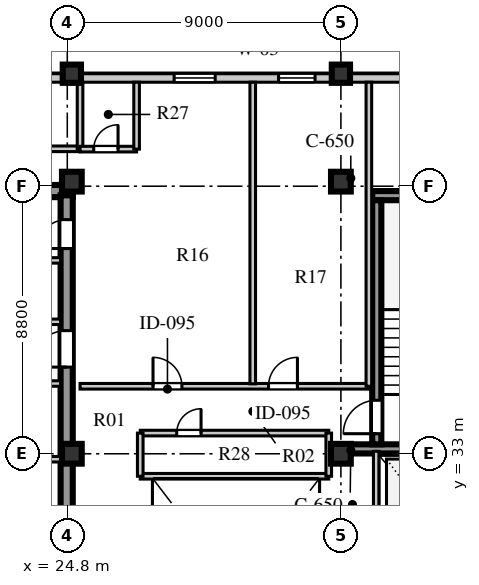
"""IFC4 building model, lengths in metres.
Left out: names, types, materials, properties, quantities, classifications, styles, units other than length and angle.
Written with IfcOpenShell. Run it as: python <this file> out.ifc"""

import sys

from ifc_helpers import new_model, si_unit, direction, frame, frame_2d, origin, origin_2d, place, context, subcontext, project, spatial, rectangle, extrude, element, fill, save


model = new_model("IFC4")
c1 = context("Model", 3, precision=1e-05, world=origin(), true_north=direction((0.0, 1.0)))
c2 = subcontext(c1, "Body", "Model", "MODEL_VIEW")
j1 = project(units=[si_unit("LENGTHUNIT", "METRE"), si_unit("PLANEANGLEUNIT", "RADIAN")], contexts=[c1])
p1 = place(None, origin())
s1 = spatial("IfcSite", under=j1, at=p1, CompositionType="ELEMENT")
p2 = place(p1, origin())
s2 = spatial("IfcBuilding", under=s1, at=p2, CompositionType="ELEMENT")
p3 = place(p2, frame((0.0, 0.0, 342.9)))
s3 = spatial("IfcBuildingStorey", under=s2, at=p3, CompositionType="ELEMENT", Elevation=342.9)
p4 = place(p3, frame((15.5, 41.64, 0.0), z_axis=(0.0, 0.0, 1.0), x_axis=(1.0, 0.0, 0.0)))
e1 = element("IfcWall", 1, at=p4, inside=s3, PredefinedType="SHEAR", context=c2, shape_type="SweptSolid", body=[
    extrude(rectangle(XDim=9.48, YDim=0.4, at=frame_2d((4.74, 0.0))), origin(), (0.0, 0.0, 1.0), 3.55),
])
p5 = place(p3, frame((24.78, 15.74, 0.0), z_axis=(0.0, 0.0, 1.0), x_axis=(0.0, 1.0, 0.0)))
e2 = element("IfcWall", 2, at=p5, inside=s3, PredefinedType="SHEAR", context=c2, shape_type="SweptSolid", body=[
    extrude(rectangle(XDim=25.76, YDim=0.4, at=frame_2d((12.88, 0.0))), origin(), (0.0, 0.0, 1.0), 3.55),
])
p6 = place(p5, frame((1.61, 0.0, 0.0)))
e3 = element("IfcOpeningElement", 3, at=p6, cuts=e2, PredefinedType="OPENING", context=c2, shape_type="SweptSolid", body=[
    extrude(rectangle(XDim=1.2, YDim=2.1, at=frame_2d((0.6, 1.05))), frame((0.0, 0.21, 0.0), z_axis=(0.0, -1.0, 0.0), x_axis=(1.0, 0.0, 0.0)), (0.0, 0.0, 1.0), 0.42),
])
p7 = place(p5, frame((6.78, 0.0, 0.0)))
e4 = element("IfcOpeningElement", 4, at=p7, cuts=e2, PredefinedType="OPENING", context=c2, shape_type="SweptSolid", body=[
    extrude(rectangle(XDim=0.85, YDim=2.06, at=frame_2d((0.425, 1.03))), frame((0.0, 0.21, 0.0), z_axis=(0.0, -1.0, 0.0), x_axis=(1.0, 0.0, 0.0)), (0.0, 0.0, 1.0), 0.42),
])
p8 = place(p5, frame((12.11, 0.0, 0.0)))
e5 = element("IfcOpeningElement", 5, at=p8, cuts=e2, PredefinedType="OPENING", context=c2, shape_type="SweptSolid", body=[
    extrude(rectangle(XDim=1.5, YDim=2.12, at=frame_2d((0.75, 1.06))), frame((0.0, 0.21, 0.0), z_axis=(0.0, -1.0, 0.0), x_axis=(1.0, 0.0, 0.0)), (0.0, 0.0, 1.0), 0.42),
])
p9 = place(p5, frame((20.11, 0.0, 0.0)))
e6 = element("IfcOpeningElement", 6, at=p9, cuts=e2, PredefinedType="OPENING", context=c2, shape_type="SweptSolid", body=[
    extrude(rectangle(XDim=1.2, YDim=2.12, at=frame_2d((0.6, 1.06))), frame((0.0, 0.21, 0.0), z_axis=(0.0, -1.0, 0.0), x_axis=(1.0, 0.0, 0.0)), (0.0, 0.0, 1.0), 0.42),
])
p10 = place(p5, frame((24.01, 0.0, 0.0)))
e7 = element("IfcOpeningElement", 7, at=p10, cuts=e2, PredefinedType="OPENING", context=c2, shape_type="SweptSolid", body=[
    extrude(rectangle(XDim=0.95, YDim=2.1, at=frame_2d((0.475, 1.05))), frame((0.0, 0.21, 0.0), z_axis=(0.0, -1.0, 0.0), x_axis=(1.0, 0.0, 0.0)), (0.0, 0.0, 1.0), 0.42),
])
p11 = place(p3, frame((34.125, 33.16, 0.0), z_axis=(0.0, 0.0, 1.0), x_axis=(1.0, 0.0, 0.0)))
e8 = element("IfcWall", 8, at=p11, inside=s3, PredefinedType="SHEAR", context=c2, shape_type="SweptSolid", body=[
    extrude(rectangle(XDim=4.745, YDim=0.3, at=frame_2d((2.373, 0.0))), origin(), (0.0, 0.0, 1.0), 3.55),
])
p12 = place(p3, frame((34.83, 41.49, 0.0), z_axis=(0.0, 0.0, 1.0), x_axis=(1.0, 0.0, 0.0)))
e9 = element("IfcWall", 9, at=p12, inside=s3, PredefinedType="SHEAR", context=c2, shape_type="SweptSolid", body=[
    extrude(rectangle(XDim=4.04, YDim=0.3, at=frame_2d((2.02, 0.0))), origin(), (0.0, 0.0, 1.0), 3.55),
])
p13 = place(p3, frame((34.98, 33.31, 0.0), z_axis=(0.0, 0.0, 1.0), x_axis=(0.0, 1.0, 0.0)))
e10 = element("IfcWall", 10, at=p13, inside=s3, PredefinedType="SHEAR", context=c2, shape_type="SweptSolid", body=[
    extrude(rectangle(XDim=8.03, YDim=0.3, at=frame_2d((4.015, 0.0))), origin(), (0.0, 0.0, 1.0), 3.55),
])
p14 = place(p13, frame((0.35, 0.0, 0.0)))
e11 = element("IfcOpeningElement", 11, at=p14, cuts=e10, PredefinedType="OPENING", context=c2, shape_type="SweptSolid", body=[
    extrude(rectangle(XDim=1.1, YDim=2.1, at=frame_2d((0.55, 1.05))), frame((0.0, 0.16, 0.0), z_axis=(0.0, -1.0, 0.0), x_axis=(1.0, 0.0, 0.0)), (0.0, 0.0, 1.0), 0.32),
])
for number, where, z_axis, x_axis in (
    (12, (24.95, 33.0, 0.0), (0.0, 0.0, 1.0), (1.0, 0.0, 0.0)),
    (13, (24.95, 41.95, 0.0), (0.0, 0.0, 1.0), (1.0, 0.0, 0.0)),
    (14, (33.8, 33.0, 0.0), (0.0, 0.0, 1.0), (1.0, 0.0, 0.0)),
    (15, (33.8, 41.95, 0.0), (0.0, 0.0, 1.0), (1.0, 0.0, 0.0)),
):
    element("IfcColumn", number, at=place(p3, frame(where, z_axis=z_axis, x_axis=x_axis)), inside=s3, PredefinedType="COLUMN", context=c2, shape_type="SweptSolid", body=[
        extrude(rectangle(XDim=0.65, YDim=0.65, at=origin_2d()), origin(), (0.0, 0.0, 1.0), 3.55),
    ])
for number, where, z_axis, x_axis in (
    (16, (24.95, 45.5, 0.0), (0.0, 0.0, 1.0), (1.0, 0.0, 0.0)),
    (17, (33.8, 45.5, 0.0), (0.0, 0.0, 1.0), (1.0, 0.0, 0.0)),
):
    element("IfcColumn", number, at=place(p3, frame(where, z_axis=z_axis, x_axis=x_axis)), inside=s3, PredefinedType="COLUMN", context=c2, shape_type="SweptSolid", body=[
        extrude(rectangle(XDim=0.6, YDim=0.6, at=origin_2d()), origin(), (0.0, 0.0, 1.0), 3.55),
    ])
p15 = place(p3, frame((39.6, 45.36, 0.0), z_axis=(0.0, 0.0, 1.0), x_axis=(-1.0, 0.0, 0.0)))
e18 = element("IfcWall", 18, at=p15, inside=s3, PredefinedType="STANDARD", context=c2, shape_type="SweptSolid", body=[
    extrude(rectangle(XDim=25.2, YDim=0.28, at=frame_2d((12.6, 0.0))), origin(), (0.0, 0.0, 1.0), 2.91),
])
p16 = place(p15, frame((18.35, 0.0, 0.8)))
e19 = element("IfcOpeningElement", 19, at=p16, cuts=e18, PredefinedType="OPENING", context=c2, shape_type="SweptSolid", body=[
    extrude(rectangle(XDim=2.1, YDim=1.95, at=frame_2d((1.05, 0.975))), frame((0.0, 0.15, 0.0), z_axis=(0.0, -1.0, 0.0), x_axis=(1.0, 0.0, 0.0)), (0.0, 0.0, 1.0), 0.3),
])
p17 = place(p15, frame((9.935, 0.0, 0.8)))
e20 = element("IfcOpeningElement", 20, at=p17, cuts=e18, PredefinedType="OPENING", context=c2, shape_type="SweptSolid", body=[
    extrude(rectangle(XDim=1.35, YDim=1.9, at=frame_2d((0.675, 0.95))), frame((0.0, 0.15, 0.0), z_axis=(0.0, -1.0, 0.0), x_axis=(1.0, 0.0, 0.0)), (0.0, 0.0, 1.0), 0.3),
])
p18 = place(p15, frame((6.65, 0.0, 0.8)))
e21 = element("IfcOpeningElement", 21, at=p18, cuts=e18, PredefinedType="OPENING", context=c2, shape_type="SweptSolid", body=[
    extrude(rectangle(XDim=1.2, YDim=1.75, at=frame_2d((0.6, 0.875))), frame((0.0, 0.15, 0.0), z_axis=(0.0, -1.0, 0.0), x_axis=(1.0, 0.0, 0.0)), (0.0, 0.0, 1.0), 0.3),
])
p19 = place(p15, frame((1.4, 0.0, 0.8)))
e22 = element("IfcOpeningElement", 22, at=p19, cuts=e18, PredefinedType="OPENING", context=c2, shape_type="SweptSolid", body=[
    extrude(rectangle(XDim=1.95, YDim=2.0, at=frame_2d((0.975, 1.0))), frame((0.0, 0.15, 0.0), z_axis=(0.0, -1.0, 0.0), x_axis=(1.0, 0.0, 0.0)), (0.0, 0.0, 1.0), 0.3),
])
p20 = place(p3, frame((15.9, 32.82, 0.0), z_axis=(0.0, 0.0, 1.0), x_axis=(1.0, 0.0, 0.0)))
e23 = element("IfcWall", 23, at=p20, inside=s3, PredefinedType="SOLIDWALL", context=c2, shape_type="SweptSolid", body=[
    extrude(rectangle(XDim=8.68, YDim=0.18, at=frame_2d((4.34, 0.0))), origin(), (0.0, 0.0, 1.0), 2.95),
])
p21 = place(p3, frame((22.02, 35.31, 0.0), z_axis=(0.0, 0.0, 1.0), x_axis=(1.0, 0.0, 0.0)))
e24 = element("IfcWall", 24, at=p21, inside=s3, PredefinedType="SOLIDWALL", context=c2, shape_type="SweptSolid", body=[
    extrude(rectangle(XDim=2.56, YDim=0.18, at=frame_2d((1.28, 0.0))), origin(), (0.0, 0.0, 1.0), 3.55),
])
p22 = place(p21, frame((0.55, 0.0, 0.0)))
e25 = element("IfcOpeningElement", 25, at=p22, cuts=e24, PredefinedType="OPENING", context=c2, shape_type="SweptSolid", body=[
    extrude(rectangle(XDim=1.0, YDim=2.1, at=frame_2d((0.5, 1.05))), frame((0.0, 0.1, 0.0), z_axis=(0.0, -1.0, 0.0), x_axis=(1.0, 0.0, 0.0)), (0.0, 0.0, 1.0), 0.2),
])
p23 = place(p3, frame((19.64, 37.34, 0.0), z_axis=(0.0, 0.0, 1.0), x_axis=(1.0, 0.0, 0.0)))
e26 = element("IfcWall", 26, at=p23, inside=s3, PredefinedType="SOLIDWALL", context=c2, shape_type="SweptSolid", body=[
    extrude(rectangle(XDim=4.94, YDim=0.18, at=frame_2d((2.47, 0.0))), origin(), (0.0, 0.0, 1.0), 3.55),
])
p24 = place(p23, frame((0.45, 0.0, 0.0)))
e27 = element("IfcOpeningElement", 27, at=p24, cuts=e26, PredefinedType="OPENING", context=c2, shape_type="SweptSolid", body=[
    extrude(rectangle(XDim=1.0, YDim=2.1, at=frame_2d((0.5, 1.05))), frame((0.0, 0.1, 0.0), z_axis=(0.0, -1.0, 0.0), x_axis=(1.0, 0.0, 0.0)), (0.0, 0.0, 1.0), 0.2),
])
p25 = place(p23, frame((2.5, 0.0, 0.0)))
e28 = element("IfcOpeningElement", 28, at=p25, cuts=e26, PredefinedType="OPENING", context=c2, shape_type="SweptSolid", body=[
    extrude(rectangle(XDim=1.0, YDim=2.1, at=frame_2d((0.5, 1.05))), frame((0.0, 0.1, 0.0), z_axis=(0.0, -1.0, 0.0), x_axis=(1.0, 0.0, 0.0)), (0.0, 0.0, 1.0), 0.2),
])
p26 = place(p3, frame((19.64, 39.36, 0.0), z_axis=(0.0, 0.0, 1.0), x_axis=(1.0, 0.0, 0.0)))
e29 = element("IfcWall", 29, at=p26, inside=s3, PredefinedType="SOLIDWALL", context=c2, shape_type="SweptSolid", body=[
    extrude(rectangle(XDim=4.94, YDim=0.18, at=frame_2d((2.47, 0.0))), origin(), (0.0, 0.0, 1.0), 3.55),
])
p27 = place(p3, frame((34.96, 28.86, 0.0), z_axis=(0.0, 0.0, 1.0), x_axis=(0.0, 1.0, 0.0)))
e30 = element("IfcWall", 30, at=p27, inside=s3, PredefinedType="SOLIDWALL", context=c2, shape_type="SweptSolid", body=[
    extrude(rectangle(XDim=4.22, YDim=0.18, at=frame_2d((2.11, 0.0))), origin(), (0.0, 0.0, 1.0), 3.55),
])
p28 = place(p3, frame((25.22, 35.22, 0.0), z_axis=(0.0, 0.0, 1.0), x_axis=(1.0, 0.0, 0.0)))
e31 = element("IfcWall", 31, at=p28, inside=s3, PredefinedType="SOLIDWALL", context=c2, shape_type="SweptSolid", body=[
    extrude(rectangle(XDim=9.5, YDim=0.185, at=frame_2d((4.75, 0.0))), origin(), (0.0, 0.0, 1.0), 3.55),
])
p29 = place(p28, frame((2.4, 0.0, 0.0)))
e32 = element("IfcOpeningElement", 32, at=p29, cuts=e31, PredefinedType="OPENING", context=c2, shape_type="SweptSolid", body=[
    extrude(rectangle(XDim=0.95, YDim=2.08, at=frame_2d((0.475, 1.04))), frame((0.0, 0.103, 0.0), z_axis=(0.0, -1.0, 0.0), x_axis=(1.0, 0.0, 0.0)), (0.0, 0.0, 1.0), 0.205),
])
p30 = place(p28, frame((6.2, 0.0, 0.0)))
e33 = element("IfcOpeningElement", 33, at=p30, cuts=e31, PredefinedType="OPENING", context=c2, shape_type="SweptSolid", body=[
    extrude(rectangle(XDim=0.95, YDim=2.08, at=frame_2d((0.475, 1.04))), frame((0.0, 0.103, 0.0), z_axis=(0.0, -1.0, 0.0), x_axis=(1.0, 0.0, 0.0)), (0.0, 0.0, 1.0), 0.205),
])
p31 = place(p3, frame((14.75, 43.03, 0.0), z_axis=(0.0, 0.0, 1.0), x_axis=(1.0, 0.0, 0.0)))
e34 = element("IfcWall", 34, at=p31, inside=s3, PredefinedType="SOLIDWALL", context=c2, shape_type="SweptSolid", body=[
    extrude(rectangle(XDim=10.47, YDim=0.185, at=frame_2d((5.235, 0.0))), origin(), (0.0, 0.0, 1.0), 3.55),
])
p32 = place(p31, frame((3.2, 0.0, 0.0)))
e35 = element("IfcOpeningElement", 35, at=p32, cuts=e34, PredefinedType="OPENING", context=c2, shape_type="SweptSolid", body=[
    extrude(rectangle(XDim=0.95, YDim=2.08, at=frame_2d((0.475, 1.04))), frame((0.0, 0.103, 0.0), z_axis=(0.0, -1.0, 0.0), x_axis=(1.0, 0.0, 0.0)), (0.0, 0.0, 1.0), 0.205),
])
p33 = place(p3, frame((25.22, 43.03, 0.0), z_axis=(0.0, 0.0, 1.0), x_axis=(0.0, 1.0, 0.0)))
e36 = element("IfcWall", 36, at=p33, inside=s3, PredefinedType="SOLIDWALL", context=c2, shape_type="SweptSolid", body=[
    extrude(rectangle(XDim=2.19, YDim=0.185, at=frame_2d((1.095, 0.0))), origin(), (0.0, 0.0, 1.0), 3.1),
])
p34 = place(p3, frame((34.72, 35.22, 0.0), z_axis=(0.0, 0.0, 1.0), x_axis=(0.0, 1.0, 0.0)))
e37 = element("IfcWall", 37, at=p34, inside=s3, PredefinedType="SOLIDWALL", context=c2, shape_type="SweptSolid", body=[
    extrude(rectangle(XDim=10.0, YDim=0.185, at=frame_2d((5.0, 0.0))), origin(), (0.0, 0.0, 1.0), 3.55),
])
p35 = place(p3, frame((30.9, 35.3, 0.0), z_axis=(0.0, 0.0, 1.0), x_axis=(0.0, 1.0, 0.0)))
e38 = element("IfcWall", 38, at=p35, inside=s3, PredefinedType="SOLIDWALL", context=c2, shape_type="SweptSolid", body=[
    extrude(rectangle(XDim=9.92, YDim=0.185, at=frame_2d((4.96, 0.0))), origin(), (0.0, 0.0, 1.0), 3.55),
])
p36 = place(p3, frame((25.22, 43.02, 0.0), z_axis=(0.0, 0.0, 1.0), x_axis=(1.0, 0.0, 0.0)))
e39 = element("IfcWall", 39, at=p36, inside=s3, PredefinedType="SOLIDWALL", context=c2, shape_type="SweptSolid", body=[
    extrude(rectangle(XDim=1.86, YDim=0.185, at=frame_2d((0.93, 0.0))), origin(), (0.0, 0.0, 1.0), 3.55),
])
p37 = place(p36, frame((0.45, 0.0, 0.0)))
e40 = element("IfcOpeningElement", 40, at=p37, cuts=e39, PredefinedType="OPENING", context=c2, shape_type="SweptSolid", body=[
    extrude(rectangle(XDim=0.8, YDim=2.05, at=frame_2d((0.4, 1.025))), frame((0.0, 0.103, 0.0), z_axis=(0.0, -1.0, 0.0), x_axis=(1.0, 0.0, 0.0)), (0.0, 0.0, 1.0), 0.205),
])
p38 = place(p3, frame((27.08, 43.02, 0.0), z_axis=(0.0, 0.0, 1.0), x_axis=(0.0, 1.0, 0.0)))
e41 = element("IfcWall", 41, at=p38, inside=s3, PredefinedType="SOLIDWALL", context=c2, shape_type="SweptSolid", body=[
    extrude(rectangle(XDim=2.2, YDim=0.185, at=frame_2d((1.1, 0.0))), origin(), (0.0, 0.0, 1.0), 3.55),
])
p39 = place(p3, frame((27.2, 33.68, 0.0), z_axis=(0.0, 0.0, 1.0), x_axis=(1.0, 0.0, 0.0)))
e42 = element("IfcWall", 42, at=p39, inside=s3, PredefinedType="SOLIDWALL", context=c2, shape_type="SweptSolid", body=[
    extrude(rectangle(XDim=6.2, YDim=0.185, at=frame_2d((3.1, 0.0))), origin(), (0.0, 0.0, 1.0), 3.55),
])
p40 = place(p39, frame((1.2, 0.0, 0.0)))
e43 = element("IfcOpeningElement", 43, at=p40, cuts=e42, PredefinedType="OPENING", context=c2, shape_type="SweptSolid", body=[
    extrude(rectangle(XDim=0.8, YDim=2.05, at=frame_2d((0.4, 1.025))), frame((0.0, 0.103, 0.0), z_axis=(0.0, -1.0, 0.0), x_axis=(1.0, 0.0, 0.0)), (0.0, 0.0, 1.0), 0.205),
])
p41 = place(p3, frame((27.2, 32.26, 0.0), z_axis=(0.0, 0.0, 1.0), x_axis=(1.0, 0.0, 0.0)))
e44 = element("IfcWall", 44, at=p41, inside=s3, PredefinedType="SOLIDWALL", context=c2, shape_type="SweptSolid", body=[
    extrude(rectangle(XDim=6.2, YDim=0.185, at=frame_2d((3.1, 0.0))), origin(), (0.0, 0.0, 1.0), 3.0),
])
p42 = place(p3, frame((27.2, 32.26, 0.0), z_axis=(0.0, 0.0, 1.0), x_axis=(0.0, 1.0, 0.0)))
e45 = element("IfcWall", 45, at=p42, inside=s3, PredefinedType="SOLIDWALL", context=c2, shape_type="SweptSolid", body=[
    extrude(rectangle(XDim=1.42, YDim=0.185, at=frame_2d((0.71, 0.0))), origin(), (0.0, 0.0, 1.0), 3.55),
])
p43 = place(p3, frame((33.4, 32.26, 0.0), z_axis=(0.0, 0.0, 1.0), x_axis=(0.0, 1.0, 0.0)))
e46 = element("IfcWall", 46, at=p43, inside=s3, PredefinedType="SOLIDWALL", context=c2, shape_type="SweptSolid", body=[
    extrude(rectangle(XDim=1.42, YDim=0.185, at=frame_2d((0.71, 0.0))), origin(), (0.0, 0.0, 1.0), 3.0),
])
p44 = place(p17, origin())
e47 = element("IfcWindow", 47, at=p44, inside=s3, PartitioningType="SINGLE_PANEL", PredefinedType="WINDOW", context=c2, shape_type="SweptSolid", body=[
    extrude(rectangle(XDim=1.35, YDim=1.9, at=frame_2d((0.675, 0.95))), frame((0.0, 0.03, 0.0), z_axis=(0.0, -1.0, 0.0), x_axis=(1.0, 0.0, 0.0)), (0.0, 0.0, 1.0), 0.06),
])
fill(e20, e47)
p45 = place(p18, origin())
e48 = element("IfcWindow", 48, at=p45, inside=s3, PartitioningType="SINGLE_PANEL", PredefinedType="WINDOW", context=c2, shape_type="SweptSolid", body=[
    extrude(rectangle(XDim=1.2, YDim=1.75, at=frame_2d((0.6, 0.875))), frame((0.0, 0.03, 0.0), z_axis=(0.0, -1.0, 0.0), x_axis=(1.0, 0.0, 0.0)), (0.0, 0.0, 1.0), 0.06),
])
fill(e21, e48)
p46 = place(p9, frame((1.2, 0.0, 0.0), z_axis=(0.0, 0.0, 1.0), x_axis=(-1.0, 0.0, 0.0)))
e49 = element("IfcDoor", 49, at=p46, inside=s3, OperationType="SINGLE_SWING_RIGHT", PredefinedType="DOOR", context=c2, shape_type="SweptSolid", body=[
    extrude(rectangle(XDim=1.2, YDim=2.12, at=frame_2d((0.6, 1.06))), frame((0.0, 0.025, 0.0), z_axis=(0.0, -1.0, 0.0), x_axis=(1.0, 0.0, 0.0)), (0.0, 0.0, 1.0), 0.05),
])
fill(e6, e49)
p47 = place(p10, frame((0.95, 0.0, 0.0), z_axis=(0.0, 0.0, 1.0), x_axis=(-1.0, 0.0, 0.0)))
e50 = element("IfcDoor", 50, at=p47, inside=s3, OperationType="SINGLE_SWING_RIGHT", PredefinedType="DOOR", context=c2, shape_type="SweptSolid", body=[
    extrude(rectangle(XDim=0.95, YDim=2.1, at=frame_2d((0.475, 1.05))), frame((0.0, 0.025, 0.0), z_axis=(0.0, -1.0, 0.0), x_axis=(1.0, 0.0, 0.0)), (0.0, 0.0, 1.0), 0.05),
])
fill(e7, e50)
p48 = place(p14, origin())
e51 = element("IfcDoor", 51, at=p48, inside=s3, OperationType="SINGLE_SWING_LEFT", PredefinedType="DOOR", context=c2, shape_type="SweptSolid", body=[
    extrude(rectangle(XDim=1.1, YDim=2.1, at=frame_2d((0.55, 1.05))), frame((0.0, 0.025, 0.0), z_axis=(0.0, -1.0, 0.0), x_axis=(1.0, 0.0, 0.0)), (0.0, 0.0, 1.0), 0.05),
])
fill(e11, e51)
p49 = place(p29, origin())
e52 = element("IfcDoor", 52, at=p49, inside=s3, OperationType="SINGLE_SWING_LEFT", PredefinedType="DOOR", context=c2, shape_type="SweptSolid", body=[
    extrude(rectangle(XDim=0.95, YDim=2.08, at=frame_2d((0.475, 1.04))), frame((0.0, 0.025, 0.0), z_axis=(0.0, -1.0, 0.0), x_axis=(1.0, 0.0, 0.0)), (0.0, 0.0, 1.0), 0.05),
])
fill(e32, e52)
p50 = place(p30, origin())
e53 = element("IfcDoor", 53, at=p50, inside=s3, OperationType="SINGLE_SWING_RIGHT", PredefinedType="DOOR", context=c2, shape_type="SweptSolid", body=[
    extrude(rectangle(XDim=0.95, YDim=2.08, at=frame_2d((0.475, 1.04))), frame((0.0, 0.025, 0.0), z_axis=(0.0, -1.0, 0.0), x_axis=(1.0, 0.0, 0.0)), (0.0, 0.0, 1.0), 0.05),
])
fill(e33, e53)
p51 = place(p37, frame((0.8, 0.0, 0.0), z_axis=(0.0, 0.0, 1.0), x_axis=(-1.0, 0.0, 0.0)))
e54 = element("IfcDoor", 54, at=p51, inside=s3, OperationType="SINGLE_SWING_LEFT", PredefinedType="DOOR", context=c2, shape_type="SweptSolid", body=[
    extrude(rectangle(XDim=0.8, YDim=2.05, at=frame_2d((0.4, 1.025))), frame((0.0, 0.025, 0.0), z_axis=(0.0, -1.0, 0.0), x_axis=(1.0, 0.0, 0.0)), (0.0, 0.0, 1.0), 0.05),
])
fill(e40, e54)
p52 = place(p40, frame((0.8, 0.0, 0.0), z_axis=(0.0, 0.0, 1.0), x_axis=(-1.0, 0.0, 0.0)))
e55 = element("IfcDoor", 55, at=p52, inside=s3, OperationType="SINGLE_SWING_LEFT", PredefinedType="DOOR", context=c2, shape_type="SweptSolid", body=[
    extrude(rectangle(XDim=0.8, YDim=2.05, at=frame_2d((0.4, 1.025))), frame((0.0, 0.025, 0.0), z_axis=(0.0, -1.0, 0.0), x_axis=(1.0, 0.0, 0.0)), (0.0, 0.0, 1.0), 0.05),
])
fill(e43, e55)
save(model, sys.argv[1])
